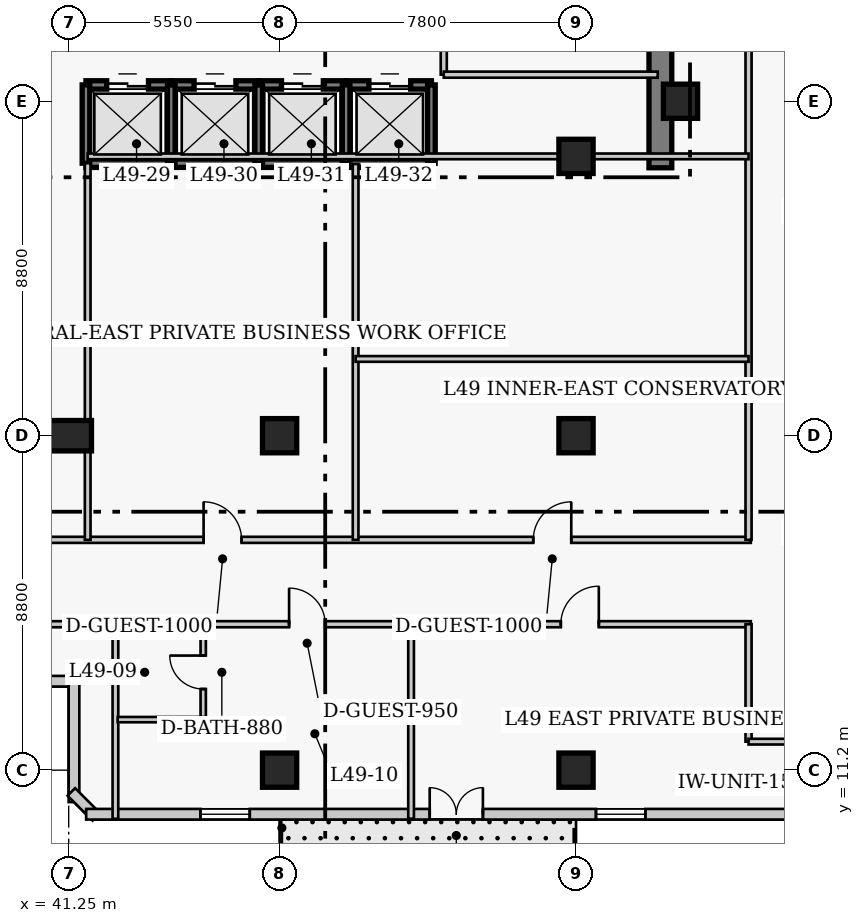
"""IFC4 building model, lengths in metres.
Left out: names, types, materials, properties, quantities, classifications, styles, units other than length and angle.
Written with IfcOpenShell. Run it as: python <this file> out.ifc"""

import sys

from ifc_helpers import new_model, si_unit, direction, frame, frame_2d, origin, origin_2d, place, context, subcontext, project, spatial, rectangle, extrude, element, fill, save


model = new_model("IFC4")
c1 = context("Model", 3, precision=1e-05, world=origin(), true_north=direction((0.0, 1.0)))
c2 = subcontext(c1, "Body", "Model", "MODEL_VIEW")
j1 = project(units=[si_unit("LENGTHUNIT", "METRE"), si_unit("PLANEANGLEUNIT", "RADIAN")], contexts=[c1])
p1 = place(None, origin())
s1 = spatial("IfcSite", under=j1, at=p1, CompositionType="ELEMENT")
p2 = place(p1, origin())
s2 = spatial("IfcBuilding", under=s1, at=p2, CompositionType="ELEMENT")
p3 = place(p2, frame((0.0, 0.0, 196.8)))
s3 = spatial("IfcBuildingStorey", under=s2, at=p3, CompositionType="ELEMENT", Elevation=196.8)
p4 = place(p3, frame((56.82, 27.05, 0.0), z_axis=(0.0, 0.0, 1.0), x_axis=(0.0, 1.0, 0.0)))
e1 = element("IfcWall", 1, at=p4, inside=s3, PredefinedType="SHEAR", context=c2, shape_type="SweptSolid", body=[
    extrude(rectangle(XDim=13.57, YDim=0.6, at=frame_2d((6.785, 0.0))), origin(), (0.0, 0.0, 1.0), 3.9),
])
p5 = place(p3, frame((41.25, 20.0, 0.0), z_axis=(0.0, 0.0, 1.0), x_axis=(1.0, 0.0, 0.0)))
e2 = element("IfcColumn", 2, at=p5, inside=s3, PredefinedType="COLUMN", context=c2, shape_type="SweptSolid", body=[
    extrude(rectangle(XDim=1.2, YDim=0.8, at=origin_2d()), origin(), (0.0, 0.0, 1.0), 3.9),
])
for number, where, z_axis, x_axis in (
    (3, (46.8, 11.2, 0.0), (0.0, 0.0, 1.0), (1.0, 0.0, 0.0)),
    (4, (46.8, 20.0, 0.0), (0.0, 0.0, 1.0), (1.0, 0.0, 0.0)),
    (5, (54.6, 11.2, 0.0), (0.0, 0.0, 1.0), (1.0, 0.0, 0.0)),
    (6, (54.6, 20.0, 0.0), (0.0, 0.0, 1.0), (1.0, 0.0, 0.0)),
    (7, (57.35, 28.8, 0.0), (0.0, 0.0, 1.0), (1.0, 0.0, 0.0)),
    (8, (54.6, 27.35, 0.0), (0.0, 0.0, 1.0), (1.0, 0.0, 0.0)),
):
    element("IfcColumn", number, at=place(p3, frame(where, z_axis=z_axis, x_axis=x_axis)), inside=s3, PredefinedType="COLUMN", context=c2, shape_type="SweptSolid", body=[
        extrude(rectangle(XDim=0.9, YDim=0.9, at=origin_2d()), origin(), (0.0, 0.0, 1.0), 3.9),
    ])
p6 = place(p3, frame((36.61, 13.54, 0.0), z_axis=(0.0, 0.0, 1.0), x_axis=(1.0, 0.0, 0.0)))
e9 = element("IfcWall", 9, at=p6, inside=s3, PredefinedType="SOLIDWALL", context=c2, shape_type="SweptSolid", body=[
    extrude(rectangle(XDim=4.78, YDim=0.28, at=frame_2d((2.39, 0.0))), origin(), (0.0, 0.0, 1.0), 3.65),
])
p7 = place(p6, frame((1.74, 0.0, 0.85)))
e10 = element("IfcOpeningElement", 10, at=p7, cuts=e9, PredefinedType="OPENING", context=c2, shape_type="SweptSolid", body=[
    extrude(rectangle(XDim=1.3, YDim=1.7, at=frame_2d((0.65, 0.85))), frame((0.0, 0.15, 0.0), z_axis=(0.0, -1.0, 0.0), x_axis=(1.0, 0.0, 0.0)), (0.0, 0.0, 1.0), 0.3),
])
p8 = place(p3, frame((41.39, 13.54, 0.0), z_axis=(0.0, 0.0, 1.0), x_axis=(0.0, -1.0, 0.0)))
e11 = element("IfcWall", 11, at=p8, inside=s3, PredefinedType="SOLIDWALL", context=c2, shape_type="SweptSolid", body=[
    extrude(rectangle(XDim=3.18, YDim=0.28, at=frame_2d((1.59, 0.0))), origin(), (0.0, 0.0, 1.0), 3.65),
])
p9 = place(p3, frame((41.321, 10.627, 0.0), z_axis=(0.0, 0.0, 1.0), x_axis=(0.707106781187, -0.707106781187, 0.0)))
e12 = element("IfcWall", 12, at=p9, inside=s3, PredefinedType="SOLIDWALL", context=c2, shape_type="SweptSolid", body=[
    extrude(rectangle(XDim=0.928, YDim=0.28, at=frame_2d((0.464, 0.0))), origin(), (0.0, 0.0, 1.0), 3.65),
])
p10 = place(p3, frame((41.71, 10.04, 0.0), z_axis=(0.0, 0.0, 1.0), x_axis=(1.0, 0.0, 0.0)))
e13 = element("IfcWall", 13, at=p10, inside=s3, PredefinedType="SOLIDWALL", context=c2, shape_type="SweptSolid", body=[
    extrude(rectangle(XDim=25.83, YDim=0.28, at=frame_2d((12.915, 0.0))), origin(), (0.0, 0.0, 1.0), 3.65),
])
p11 = place(p10, frame((9.04, 0.0, 0.0)))
e14 = element("IfcOpeningElement", 14, at=p11, cuts=e13, PredefinedType="OPENING", context=c2, shape_type="SweptSolid", body=[
    extrude(rectangle(XDim=1.4, YDim=2.15, at=frame_2d((0.7, 1.075))), frame((0.0, 0.15, 0.0), z_axis=(0.0, -1.0, 0.0), x_axis=(1.0, 0.0, 0.0)), (0.0, 0.0, 1.0), 0.3),
])
p12 = place(p10, frame((3.005, 0.0, 0.85)))
e15 = element("IfcOpeningElement", 15, at=p12, cuts=e13, PredefinedType="OPENING", context=c2, shape_type="SweptSolid", body=[
    extrude(rectangle(XDim=1.3, YDim=1.7, at=frame_2d((0.65, 0.85))), frame((0.0, 0.15, 0.0), z_axis=(0.0, -1.0, 0.0), x_axis=(1.0, 0.0, 0.0)), (0.0, 0.0, 1.0), 0.3),
])
p13 = place(p10, frame((13.415, 0.0, 0.85)))
e16 = element("IfcOpeningElement", 16, at=p13, cuts=e13, PredefinedType="OPENING", context=c2, shape_type="SweptSolid", body=[
    extrude(rectangle(XDim=1.3, YDim=1.7, at=frame_2d((0.65, 0.85))), frame((0.0, 0.15, 0.0), z_axis=(0.0, -1.0, 0.0), x_axis=(1.0, 0.0, 0.0)), (0.0, 0.0, 1.0), 0.3),
])
p14 = place(p10, frame((21.525, 0.0, 0.85)))
e17 = element("IfcOpeningElement", 17, at=p14, cuts=e13, PredefinedType="OPENING", context=c2, shape_type="SweptSolid", body=[
    extrude(rectangle(XDim=1.3, YDim=1.7, at=frame_2d((0.65, 0.85))), frame((0.0, 0.15, 0.0), z_axis=(0.0, -1.0, 0.0), x_axis=(1.0, 0.0, 0.0)), (0.0, 0.0, 1.0), 0.3),
])
p15 = place(p3, frame((41.705, 29.23, 0.0), z_axis=(0.0, 0.0, 1.0), x_axis=(1.0, 0.0, 0.0)))
e18 = element("IfcWall", 18, at=p15, inside=s3, PredefinedType="SHEAR", context=c2, shape_type="SweptSolid", body=[
    extrude(rectangle(XDim=2.245, YDim=0.22, at=frame_2d((1.123, 0.0))), origin(), (0.0, 0.0, 1.0), 3.9),
])
p16 = place(p15, frame((0.545, 0.0, 0.0)))
e19 = element("IfcOpeningElement", 19, at=p16, cuts=e18, PredefinedType="OPENING", context=c2, shape_type="SweptSolid", body=[
    extrude(rectangle(XDim=1.1, YDim=2.15, at=frame_2d((0.55, 1.075))), frame((0.0, 0.12, 0.0), z_axis=(0.0, -1.0, 0.0), x_axis=(1.0, 0.0, 0.0)), (0.0, 0.0, 1.0), 0.24),
])
p17 = place(p3, frame((41.705, 27.17, 0.0), z_axis=(0.0, 0.0, 1.0), x_axis=(1.0, 0.0, 0.0)))
e20 = element("IfcWall", 20, at=p17, inside=s3, PredefinedType="SHEAR", context=c2, shape_type="SweptSolid", body=[
    extrude(rectangle(XDim=2.245, YDim=0.22, at=frame_2d((1.123, 0.0))), origin(), (0.0, 0.0, 1.0), 3.9),
])
p18 = place(p3, frame((41.705, 27.17, 0.0), z_axis=(0.0, 0.0, 1.0), x_axis=(0.0, 1.0, 0.0)))
e21 = element("IfcWall", 21, at=p18, inside=s3, PredefinedType="SHEAR", context=c2, shape_type="SweptSolid", body=[
    extrude(rectangle(XDim=2.06, YDim=0.2, at=frame_2d((1.03, 0.0))), origin(), (0.0, 0.0, 1.0), 3.9),
])
p19 = place(p3, frame((43.95, 29.23, 0.0), z_axis=(0.0, 0.0, 1.0), x_axis=(1.0, 0.0, 0.0)))
e22 = element("IfcWall", 22, at=p19, inside=s3, PredefinedType="SHEAR", context=c2, shape_type="SweptSolid", body=[
    extrude(rectangle(XDim=2.3, YDim=0.22, at=frame_2d((1.15, 0.0))), origin(), (0.0, 0.0, 1.0), 3.9),
])
p20 = place(p19, frame((0.6, 0.0, 0.0)))
e23 = element("IfcOpeningElement", 23, at=p20, cuts=e22, PredefinedType="OPENING", context=c2, shape_type="SweptSolid", body=[
    extrude(rectangle(XDim=1.1, YDim=2.15, at=frame_2d((0.55, 1.075))), frame((0.0, 0.12, 0.0), z_axis=(0.0, -1.0, 0.0), x_axis=(1.0, 0.0, 0.0)), (0.0, 0.0, 1.0), 0.24),
])
p21 = place(p3, frame((43.95, 27.17, 0.0), z_axis=(0.0, 0.0, 1.0), x_axis=(1.0, 0.0, 0.0)))
e24 = element("IfcWall", 24, at=p21, inside=s3, PredefinedType="SHEAR", context=c2, shape_type="SweptSolid", body=[
    extrude(rectangle(XDim=2.3, YDim=0.22, at=frame_2d((1.15, 0.0))), origin(), (0.0, 0.0, 1.0), 3.9),
])
p22 = place(p3, frame((43.95, 27.17, 0.0), z_axis=(0.0, 0.0, 1.0), x_axis=(0.0, 1.0, 0.0)))
e25 = element("IfcWall", 25, at=p22, inside=s3, PredefinedType="SHEAR", context=c2, shape_type="SweptSolid", body=[
    extrude(rectangle(XDim=2.06, YDim=0.2, at=frame_2d((1.03, 0.0))), origin(), (0.0, 0.0, 1.0), 3.9),
])
p23 = place(p3, frame((46.25, 29.23, 0.0), z_axis=(0.0, 0.0, 1.0), x_axis=(1.0, 0.0, 0.0)))
e26 = element("IfcWall", 26, at=p23, inside=s3, PredefinedType="SHEAR", context=c2, shape_type="SweptSolid", body=[
    extrude(rectangle(XDim=2.3, YDim=0.22, at=frame_2d((1.15, 0.0))), origin(), (0.0, 0.0, 1.0), 3.9),
])
p24 = place(p23, frame((0.6, 0.0, 0.0)))
e27 = element("IfcOpeningElement", 27, at=p24, cuts=e26, PredefinedType="OPENING", context=c2, shape_type="SweptSolid", body=[
    extrude(rectangle(XDim=1.1, YDim=2.15, at=frame_2d((0.55, 1.075))), frame((0.0, 0.12, 0.0), z_axis=(0.0, -1.0, 0.0), x_axis=(1.0, 0.0, 0.0)), (0.0, 0.0, 1.0), 0.24),
])
p25 = place(p3, frame((46.25, 27.17, 0.0), z_axis=(0.0, 0.0, 1.0), x_axis=(1.0, 0.0, 0.0)))
e28 = element("IfcWall", 28, at=p25, inside=s3, PredefinedType="SHEAR", context=c2, shape_type="SweptSolid", body=[
    extrude(rectangle(XDim=2.3, YDim=0.22, at=frame_2d((1.15, 0.0))), origin(), (0.0, 0.0, 1.0), 3.9),
])
p26 = place(p3, frame((46.25, 27.17, 0.0), z_axis=(0.0, 0.0, 1.0), x_axis=(0.0, 1.0, 0.0)))
e29 = element("IfcWall", 29, at=p26, inside=s3, PredefinedType="SHEAR", context=c2, shape_type="SweptSolid", body=[
    extrude(rectangle(XDim=2.06, YDim=0.2, at=frame_2d((1.03, 0.0))), origin(), (0.0, 0.0, 1.0), 3.9),
])
p27 = place(p3, frame((48.55, 29.23, 0.0), z_axis=(0.0, 0.0, 1.0), x_axis=(1.0, 0.0, 0.0)))
e30 = element("IfcWall", 30, at=p27, inside=s3, PredefinedType="SHEAR", context=c2, shape_type="SweptSolid", body=[
    extrude(rectangle(XDim=2.245, YDim=0.22, at=frame_2d((1.123, 0.0))), origin(), (0.0, 0.0, 1.0), 3.9),
])
p28 = place(p27, frame((0.6, 0.0, 0.0)))
e31 = element("IfcOpeningElement", 31, at=p28, cuts=e30, PredefinedType="OPENING", context=c2, shape_type="SweptSolid", body=[
    extrude(rectangle(XDim=1.1, YDim=2.15, at=frame_2d((0.55, 1.075))), frame((0.0, 0.12, 0.0), z_axis=(0.0, -1.0, 0.0), x_axis=(1.0, 0.0, 0.0)), (0.0, 0.0, 1.0), 0.24),
])
p29 = place(p3, frame((48.55, 27.17, 0.0), z_axis=(0.0, 0.0, 1.0), x_axis=(1.0, 0.0, 0.0)))
e32 = element("IfcWall", 32, at=p29, inside=s3, PredefinedType="SHEAR", context=c2, shape_type="SweptSolid", body=[
    extrude(rectangle(XDim=2.245, YDim=0.22, at=frame_2d((1.123, 0.0))), origin(), (0.0, 0.0, 1.0), 3.9),
])
for number, where, z_axis, x_axis in (
    (33, (48.55, 27.17, 0.0), (0.0, 0.0, 1.0), (0.0, 1.0, 0.0)),
    (34, (50.795, 27.17, 0.0), (0.0, 0.0, 1.0), (0.0, 1.0, 0.0)),
):
    element("IfcWall", number, at=place(p3, frame(where, z_axis=z_axis, x_axis=x_axis)), inside=s3, PredefinedType="SHEAR", context=c2, shape_type="SweptSolid", body=[
        extrude(rectangle(XDim=2.06, YDim=0.2, at=frame_2d((1.03, 0.0))), origin(), (0.0, 0.0, 1.0), 3.9),
    ])
p30 = place(p3, frame((51.12, 29.5, 0.0), z_axis=(0.0, 0.0, 1.0), x_axis=(0.0, 1.0, 0.0)))
e35 = element("IfcWall", 35, at=p30, inside=s3, PredefinedType="PARTITIONING", context=c2, shape_type="SweptSolid", body=[
    extrude(rectangle(XDim=3.7, YDim=0.16, at=frame_2d((1.85, 0.0))), origin(), (0.0, 0.0, 1.0), 3.65),
])
p31 = place(p30, frame((0.9, 0.0, 0.0)))
e36 = element("IfcOpeningElement", 36, at=p31, cuts=e35, PredefinedType="OPENING", context=c2, shape_type="SweptSolid", body=[
    extrude(rectangle(XDim=1.1, YDim=2.15, at=frame_2d((0.55, 1.075))), frame((0.0, 0.09, 0.0), z_axis=(0.0, -1.0, 0.0), x_axis=(1.0, 0.0, 0.0)), (0.0, 0.0, 1.0), 0.18),
])
p32 = place(p3, frame((51.12, 29.5, 0.0), z_axis=(0.0, 0.0, 1.0), x_axis=(1.0, 0.0, 0.0)))
e37 = element("IfcWall", 37, at=p32, inside=s3, PredefinedType="PARTITIONING", context=c2, shape_type="SweptSolid", body=[
    extrude(rectangle(XDim=5.63, YDim=0.16, at=frame_2d((2.815, 0.0))), origin(), (0.0, 0.0, 1.0), 3.65),
])
p33 = place(p3, frame((35.85, 17.26, 0.0), z_axis=(0.0, 0.0, 1.0), x_axis=(1.0, 0.0, 0.0)))
e38 = element("IfcWall", 38, at=p33, inside=s3, PredefinedType="PARTITIONING", context=c2, shape_type="SweptSolid", body=[
    extrude(rectangle(XDim=23.35, YDim=0.16, at=frame_2d((11.675, 0.0))), origin(), (0.0, 0.0, 1.0), 3.65),
])
p34 = place(p33, frame((8.95, 0.0, 0.0)))
e39 = element("IfcOpeningElement", 39, at=p34, cuts=e38, PredefinedType="OPENING", context=c2, shape_type="SweptSolid", body=[
    extrude(rectangle(XDim=1.0, YDim=2.15, at=frame_2d((0.5, 1.075))), frame((0.0, 0.09, 0.0), z_axis=(0.0, -1.0, 0.0), x_axis=(1.0, 0.0, 0.0)), (0.0, 0.0, 1.0), 0.18),
])
p35 = place(p33, frame((17.625, 0.0, 0.0)))
e40 = element("IfcOpeningElement", 40, at=p35, cuts=e38, PredefinedType="OPENING", context=c2, shape_type="SweptSolid", body=[
    extrude(rectangle(XDim=1.0, YDim=2.15, at=frame_2d((0.5, 1.075))), frame((0.0, 0.09, 0.0), z_axis=(0.0, -1.0, 0.0), x_axis=(1.0, 0.0, 0.0)), (0.0, 0.0, 1.0), 0.18),
])
p36 = place(p3, frame((35.8, 15.04, 0.0), z_axis=(0.0, 0.0, 1.0), x_axis=(1.0, 0.0, 0.0)))
e41 = element("IfcWall", 41, at=p36, inside=s3, PredefinedType="PARTITIONING", context=c2, shape_type="SweptSolid", body=[
    extrude(rectangle(XDim=23.4, YDim=0.16, at=frame_2d((11.7, 0.0))), origin(), (0.0, 0.0, 1.0), 3.65),
])
p37 = place(p36, frame((11.25, 0.0, 0.0)))
e42 = element("IfcOpeningElement", 42, at=p37, cuts=e41, PredefinedType="OPENING", context=c2, shape_type="SweptSolid", body=[
    extrude(rectangle(XDim=0.95, YDim=2.1, at=frame_2d((0.475, 1.05))), frame((0.0, 0.09, 0.0), z_axis=(0.0, -1.0, 0.0), x_axis=(1.0, 0.0, 0.0)), (0.0, 0.0, 1.0), 0.18),
])
p38 = place(p36, frame((18.4, 0.0, 0.0)))
e43 = element("IfcOpeningElement", 43, at=p38, cuts=e41, PredefinedType="OPENING", context=c2, shape_type="SweptSolid", body=[
    extrude(rectangle(XDim=1.0, YDim=2.15, at=frame_2d((0.5, 1.075))), frame((0.0, 0.09, 0.0), z_axis=(0.0, -1.0, 0.0), x_axis=(1.0, 0.0, 0.0)), (0.0, 0.0, 1.0), 0.18),
])
p39 = place(p3, frame((59.14, 17.26, 0.0), z_axis=(0.0, 0.0, 1.0), x_axis=(0.0, 1.0, 0.0)))
e44 = element("IfcWall", 44, at=p39, inside=s3, PredefinedType="PARTITIONING", context=c2, shape_type="SweptSolid", body=[
    extrude(rectangle(XDim=23.39, YDim=0.16, at=frame_2d((11.695, 0.0))), origin(), (0.0, 0.0, 1.0), 3.65),
])
p40 = place(p3, frame((59.14, 11.95, 0.0), z_axis=(0.0, 0.0, 1.0), x_axis=(0.0, 1.0, 0.0)))
e45 = element("IfcWall", 45, at=p40, inside=s3, PredefinedType="PARTITIONING", context=c2, shape_type="SweptSolid", body=[
    extrude(rectangle(XDim=3.09, YDim=0.16, at=frame_2d((1.545, 0.0))), origin(), (0.0, 0.0, 1.0), 3.65),
])
p41 = place(p3, frame((59.14, 11.95, 0.0), z_axis=(0.0, 0.0, 1.0), x_axis=(1.0, 0.0, 0.0)))
e46 = element("IfcWall", 46, at=p41, inside=s3, PredefinedType="PARTITIONING", context=c2, shape_type="SweptSolid", body=[
    extrude(rectangle(XDim=2.22, YDim=0.15, at=frame_2d((1.11, 0.0))), origin(), (0.0, 0.0, 1.0), 3.65),
])
p42 = place(p3, frame((41.75, 17.26, 0.0), z_axis=(0.0, 0.0, 1.0), x_axis=(0.0, 1.0, 0.0)))
e47 = element("IfcWall", 47, at=p42, inside=s3, PredefinedType="PARTITIONING", context=c2, shape_type="SweptSolid", body=[
    extrude(rectangle(XDim=9.91, YDim=0.15, at=frame_2d((4.955, 0.0))), origin(), (0.0, 0.0, 1.0), 3.65),
])
p43 = place(p3, frame((48.8, 17.26, 0.0), z_axis=(0.0, 0.0, 1.0), x_axis=(0.0, 1.0, 0.0)))
e48 = element("IfcWall", 48, at=p43, inside=s3, PredefinedType="PARTITIONING", context=c2, shape_type="SweptSolid", body=[
    extrude(rectangle(XDim=9.89, YDim=0.15, at=frame_2d((4.945, 0.0))), origin(), (0.0, 0.0, 1.0), 3.65),
])
p44 = place(p3, frame((41.75, 27.35, 0.0), z_axis=(0.0, 0.0, 1.0), x_axis=(1.0, 0.0, 0.0)))
e49 = element("IfcWall", 49, at=p44, inside=s3, PredefinedType="PARTITIONING", context=c2, shape_type="SweptSolid", body=[
    extrude(rectangle(XDim=17.39, YDim=0.15, at=frame_2d((8.695, 0.0))), origin(), (0.0, 0.0, 1.0), 3.65),
])
p45 = place(p3, frame((48.8, 22.02, 0.0), z_axis=(0.0, 0.0, 1.0), x_axis=(1.0, 0.0, 0.0)))
e50 = element("IfcWall", 50, at=p45, inside=s3, PredefinedType="PARTITIONING", context=c2, shape_type="SweptSolid", body=[
    extrude(rectangle(XDim=10.34, YDim=0.15, at=frame_2d((5.17, 0.0))), origin(), (0.0, 0.0, 1.0), 3.65),
])
p46 = place(p3, frame((42.48, 9.92, 0.0), z_axis=(0.0, 0.0, 1.0), x_axis=(0.0, 1.0, 0.0)))
e51 = element("IfcWall", 51, at=p46, inside=s3, PredefinedType="PARTITIONING", context=c2, shape_type="SweptSolid", body=[
    extrude(rectangle(XDim=5.12, YDim=0.15, at=frame_2d((2.56, 0.0))), origin(), (0.0, 0.0, 1.0), 3.65),
])
p47 = place(p3, frame((44.79, 12.53, 0.0), z_axis=(0.0, 0.0, 1.0), x_axis=(0.0, 1.0, 0.0)))
e52 = element("IfcWall", 52, at=p47, inside=s3, PredefinedType="PLUMBINGWALL", context=c2, shape_type="SweptSolid", body=[
    extrude(rectangle(XDim=2.49, YDim=0.14, at=frame_2d((1.245, 0.0))), origin(), (0.0, 0.0, 1.0), 3.65),
])
p48 = place(p47, frame((0.805, 0.0, 0.0)))
e53 = element("IfcOpeningElement", 53, at=p48, cuts=e52, PredefinedType="OPENING", context=c2, shape_type="SweptSolid", body=[
    extrude(rectangle(XDim=0.88, YDim=2.05, at=frame_2d((0.44, 1.025))), frame((0.0, 0.08, 0.0), z_axis=(0.0, -1.0, 0.0), x_axis=(1.0, 0.0, 0.0)), (0.0, 0.0, 1.0), 0.16),
])
p49 = place(p3, frame((42.54, 12.53, 0.0), z_axis=(0.0, 0.0, 1.0), x_axis=(1.0, 0.0, 0.0)))
e54 = element("IfcWall", 54, at=p49, inside=s3, PredefinedType="PLUMBINGWALL", context=c2, shape_type="SweptSolid", body=[
    extrude(rectangle(XDim=2.25, YDim=0.14, at=frame_2d((1.125, 0.0))), origin(), (0.0, 0.0, 1.0), 3.65),
])
p50 = place(p3, frame((50.26, 9.92, 0.0), z_axis=(0.0, 0.0, 1.0), x_axis=(0.0, 1.0, 0.0)))
e55 = element("IfcWall", 55, at=p50, inside=s3, PredefinedType="PARTITIONING", context=c2, shape_type="SweptSolid", body=[
    extrude(rectangle(XDim=5.12, YDim=0.15, at=frame_2d((2.56, 0.0))), origin(), (0.0, 0.0, 1.0), 3.65),
])
p51 = place(p11, origin())
e56 = element("IfcDoor", 56, at=p51, inside=s3, OperationType="DOUBLE_DOOR_SINGLE_SWING", PredefinedType="DOOR", context=c2, shape_type="SweptSolid", body=[
    extrude(rectangle(XDim=1.4, YDim=2.15, at=frame_2d((0.7, 1.075))), frame((0.0, 0.025, 0.0), z_axis=(0.0, -1.0, 0.0), x_axis=(1.0, 0.0, 0.0)), (0.0, 0.0, 1.0), 0.05),
])
fill(e14, e56)
p52 = place(p12, origin())
e57 = element("IfcWindow", 57, at=p52, inside=s3, PartitioningType="SINGLE_PANEL", PredefinedType="WINDOW", context=c2, shape_type="SweptSolid", body=[
    extrude(rectangle(XDim=1.3, YDim=1.7, at=frame_2d((0.65, 0.85))), frame((0.0, 0.03, 0.0), z_axis=(0.0, -1.0, 0.0), x_axis=(1.0, 0.0, 0.0)), (0.0, 0.0, 1.0), 0.06),
])
fill(e15, e57)
p53 = place(p13, origin())
e58 = element("IfcWindow", 58, at=p53, inside=s3, PartitioningType="SINGLE_PANEL", PredefinedType="WINDOW", context=c2, shape_type="SweptSolid", body=[
    extrude(rectangle(XDim=1.3, YDim=1.7, at=frame_2d((0.65, 0.85))), frame((0.0, 0.03, 0.0), z_axis=(0.0, -1.0, 0.0), x_axis=(1.0, 0.0, 0.0)), (0.0, 0.0, 1.0), 0.06),
])
fill(e16, e58)
p54 = place(p16, origin())
e59 = element("IfcDoor", 59, at=p54, inside=s3, OperationType="DOUBLE_DOOR_SLIDING", PredefinedType="DOOR", context=c2, shape_type="SweptSolid", body=[
    extrude(rectangle(XDim=1.1, YDim=2.15, at=frame_2d((0.55, 1.075))), frame((0.0, 0.025, 0.0), z_axis=(0.0, -1.0, 0.0), x_axis=(1.0, 0.0, 0.0)), (0.0, 0.0, 1.0), 0.05),
])
fill(e19, e59)
p55 = place(p20, origin())
e60 = element("IfcDoor", 60, at=p55, inside=s3, OperationType="DOUBLE_DOOR_SLIDING", PredefinedType="DOOR", context=c2, shape_type="SweptSolid", body=[
    extrude(rectangle(XDim=1.1, YDim=2.15, at=frame_2d((0.55, 1.075))), frame((0.0, 0.025, 0.0), z_axis=(0.0, -1.0, 0.0), x_axis=(1.0, 0.0, 0.0)), (0.0, 0.0, 1.0), 0.05),
])
fill(e23, e60)
p56 = place(p24, origin())
e61 = element("IfcDoor", 61, at=p56, inside=s3, OperationType="DOUBLE_DOOR_SLIDING", PredefinedType="DOOR", context=c2, shape_type="SweptSolid", body=[
    extrude(rectangle(XDim=1.1, YDim=2.15, at=frame_2d((0.55, 1.075))), frame((0.0, 0.025, 0.0), z_axis=(0.0, -1.0, 0.0), x_axis=(1.0, 0.0, 0.0)), (0.0, 0.0, 1.0), 0.05),
])
fill(e27, e61)
p57 = place(p28, origin())
e62 = element("IfcDoor", 62, at=p57, inside=s3, OperationType="DOUBLE_DOOR_SLIDING", PredefinedType="DOOR", context=c2, shape_type="SweptSolid", body=[
    extrude(rectangle(XDim=1.1, YDim=2.15, at=frame_2d((0.55, 1.075))), frame((0.0, 0.025, 0.0), z_axis=(0.0, -1.0, 0.0), x_axis=(1.0, 0.0, 0.0)), (0.0, 0.0, 1.0), 0.05),
])
fill(e31, e62)
p58 = place(p34, origin())
e63 = element("IfcDoor", 63, at=p58, inside=s3, OperationType="SINGLE_SWING_LEFT", PredefinedType="DOOR", context=c2, shape_type="SweptSolid", body=[
    extrude(rectangle(XDim=1.0, YDim=2.15, at=frame_2d((0.5, 1.075))), frame((0.0, 0.025, 0.0), z_axis=(0.0, -1.0, 0.0), x_axis=(1.0, 0.0, 0.0)), (0.0, 0.0, 1.0), 0.05),
])
fill(e39, e63)
p59 = place(p35, origin())
e64 = element("IfcDoor", 64, at=p59, inside=s3, OperationType="SINGLE_SWING_RIGHT", PredefinedType="DOOR", context=c2, shape_type="SweptSolid", body=[
    extrude(rectangle(XDim=1.0, YDim=2.15, at=frame_2d((0.5, 1.075))), frame((0.0, 0.025, 0.0), z_axis=(0.0, -1.0, 0.0), x_axis=(1.0, 0.0, 0.0)), (0.0, 0.0, 1.0), 0.05),
])
fill(e40, e64)
p60 = place(p48, origin())
e65 = element("IfcDoor", 65, at=p60, inside=s3, OperationType="SINGLE_SWING_RIGHT", PredefinedType="DOOR", context=c2, shape_type="SweptSolid", body=[
    extrude(rectangle(XDim=0.88, YDim=2.05, at=frame_2d((0.44, 1.025))), frame((0.0, 0.025, 0.0), z_axis=(0.0, -1.0, 0.0), x_axis=(1.0, 0.0, 0.0)), (0.0, 0.0, 1.0), 0.05),
])
fill(e53, e65)
p61 = place(p37, origin())
e66 = element("IfcDoor", 66, at=p61, inside=s3, OperationType="SINGLE_SWING_LEFT", PredefinedType="DOOR", context=c2, shape_type="SweptSolid", body=[
    extrude(rectangle(XDim=0.95, YDim=2.1, at=frame_2d((0.475, 1.05))), frame((0.0, 0.025, 0.0), z_axis=(0.0, -1.0, 0.0), x_axis=(1.0, 0.0, 0.0)), (0.0, 0.0, 1.0), 0.05),
])
fill(e42, e66)
p62 = place(p38, origin())
e67 = element("IfcDoor", 67, at=p62, inside=s3, OperationType="SINGLE_SWING_RIGHT", PredefinedType="DOOR", context=c2, shape_type="SweptSolid", body=[
    extrude(rectangle(XDim=1.0, YDim=2.15, at=frame_2d((0.5, 1.075))), frame((0.0, 0.025, 0.0), z_axis=(0.0, -1.0, 0.0), x_axis=(1.0, 0.0, 0.0)), (0.0, 0.0, 1.0), 0.05),
])
fill(e43, e67)
save(model, sys.argv[1])
